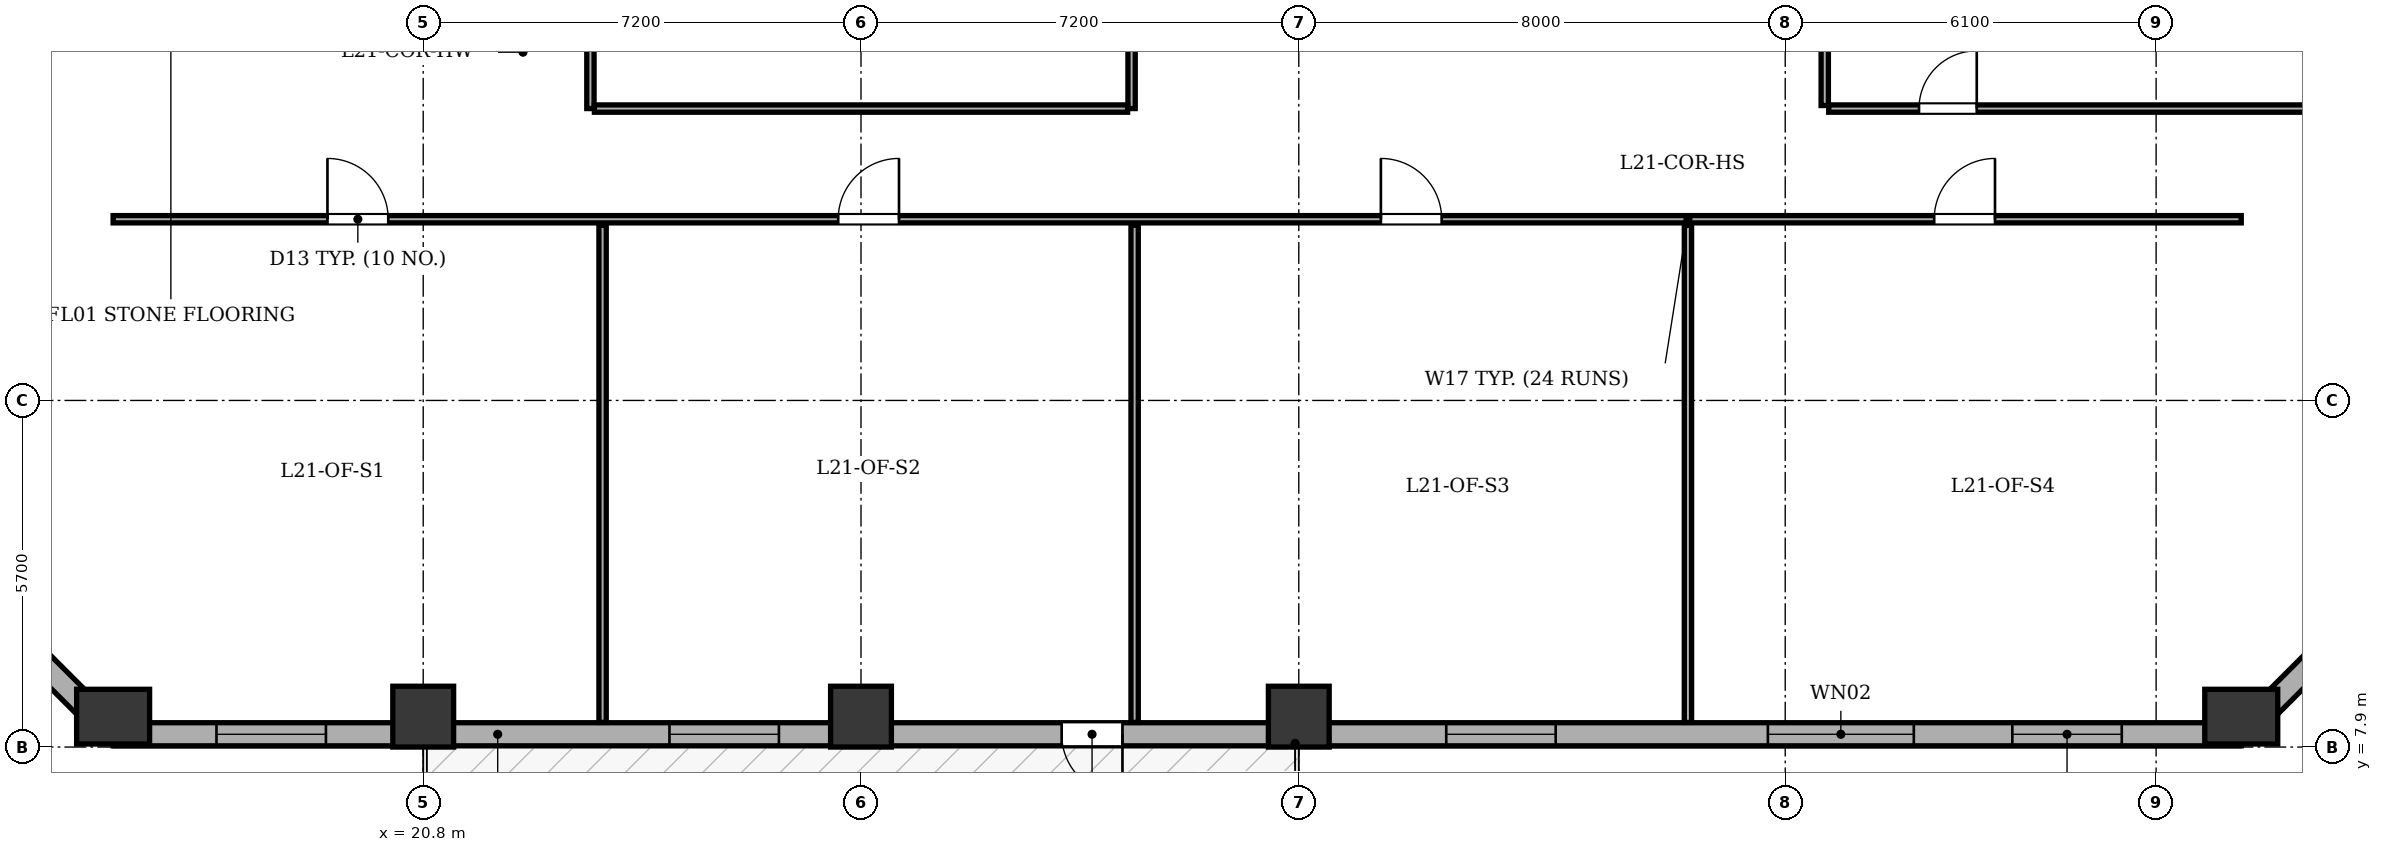
"""IFC4 building model, lengths in metres.
Left out: names, types, materials, properties, quantities, classifications, styles, units other than length and angle.
Written with IfcOpenShell. Run it as: python <this file> out.ifc"""

import sys

from ifc_helpers import new_model, si_unit, direction, frame, frame_2d, origin, origin_2d, place, context, subcontext, project, spatial, rectangle, extrude, element, fill, save


model = new_model("IFC4")
c1 = context("Model", 3, precision=1e-05, world=origin(), true_north=direction((0.0, 1.0)))
c2 = subcontext(c1, "Body", "Model", "MODEL_VIEW")
j1 = project(units=[si_unit("LENGTHUNIT", "METRE"), si_unit("PLANEANGLEUNIT", "RADIAN")], contexts=[c1])
p1 = place(None, origin())
s1 = spatial("IfcSite", under=j1, at=p1, CompositionType="ELEMENT")
p2 = place(p1, origin())
s2 = spatial("IfcBuilding", under=s1, at=p2, CompositionType="ELEMENT")
p3 = place(p2, frame((0.0, 0.0, 86.7)))
s3 = spatial("IfcBuildingStorey", under=s2, at=p3, CompositionType="ELEMENT", Elevation=86.7)
p4 = place(p3, frame((15.7, 8.4, 0.0), z_axis=(0.0, 0.0, 1.0), x_axis=(1.0, 0.0, 0.0)))
e1 = element("IfcColumn", 1, at=p4, inside=s3, PredefinedType="COLUMN", context=c2, shape_type="SweptSolid", body=[
    extrude(rectangle(XDim=0.9, YDim=1.2, at=origin_2d()), origin(), (0.0, 0.0, 1.0), 3.9),
])
for number, where, z_axis, x_axis in (
    (2, (20.8, 8.4, 0.0), (0.0, 0.0, 1.0), (1.0, 0.0, 0.0)),
    (3, (28.0, 8.4, 0.0), (0.0, 0.0, 1.0), (1.0, 0.0, 0.0)),
    (4, (35.2, 8.4, 0.0), (0.0, 0.0, 1.0), (1.0, 0.0, 0.0)),
):
    element("IfcColumn", number, at=place(p3, frame(where, z_axis=z_axis, x_axis=x_axis)), inside=s3, PredefinedType="COLUMN", context=c2, shape_type="SweptSolid", body=[
        extrude(rectangle(XDim=1.0, YDim=1.0, at=origin_2d()), origin(), (0.0, 0.0, 1.0), 3.9),
    ])
p5 = place(p3, frame((50.7, 8.4, 0.0), z_axis=(0.0, 0.0, 1.0), x_axis=(1.0, 0.0, 0.0)))
e5 = element("IfcColumn", 5, at=p5, inside=s3, PredefinedType="COLUMN", context=c2, shape_type="SweptSolid", body=[
    extrude(rectangle(XDim=0.9, YDim=1.2, at=origin_2d()), origin(), (0.0, 0.0, 1.0), 3.9),
])
p6 = place(p3, frame((50.7, 8.11, 0.0), z_axis=(0.0, 0.0, 1.0), x_axis=(-1.0, 0.0, 0.0)))
e6 = element("IfcWall", 6, at=p6, inside=s3, PredefinedType="STANDARD", context=c2, shape_type="SweptSolid", body=[
    extrude(rectangle(XDim=35.0, YDim=0.38, at=frame_2d((17.5, 0.0))), origin(), (0.0, 0.0, 1.0), 3.135),
])
p7 = place(p6, frame((18.4, 0.0, 0.0)))
e7 = element("IfcOpeningElement", 7, at=p7, cuts=e6, PredefinedType="OPENING", context=c2, shape_type="SweptSolid", body=[
    extrude(rectangle(XDim=1.0, YDim=2.02, at=frame_2d((0.5, 1.01))), frame((0.0, 0.2, 0.0), z_axis=(0.0, -1.0, 0.0), x_axis=(1.0, 0.0, 0.0)), (0.0, 0.0, 1.0), 0.4),
])
p8 = place(p6, frame((1.965, 0.0, 0.8)))
e8 = element("IfcOpeningElement", 8, at=p8, cuts=e6, PredefinedType="OPENING", context=c2, shape_type="SweptSolid", body=[
    extrude(rectangle(XDim=1.8, YDim=1.9, at=frame_2d((0.9, 0.95))), frame((0.0, 0.2, 0.0), z_axis=(0.0, -1.0, 0.0), x_axis=(1.0, 0.0, 0.0)), (0.0, 0.0, 1.0), 0.4),
])
p9 = place(p6, frame((5.385, 0.0, 0.8)))
e9 = element("IfcOpeningElement", 9, at=p9, cuts=e6, PredefinedType="OPENING", context=c2, shape_type="SweptSolid", body=[
    extrude(rectangle(XDim=2.4, YDim=1.9, at=frame_2d((1.2, 0.95))), frame((0.0, 0.2, 0.0), z_axis=(0.0, -1.0, 0.0), x_axis=(1.0, 0.0, 0.0)), (0.0, 0.0, 1.0), 0.4),
])
p10 = place(p6, frame((11.275, 0.0, 0.8)))
e10 = element("IfcOpeningElement", 10, at=p10, cuts=e6, PredefinedType="OPENING", context=c2, shape_type="SweptSolid", body=[
    extrude(rectangle(XDim=1.8, YDim=1.9, at=frame_2d((0.9, 0.95))), frame((0.0, 0.2, 0.0), z_axis=(0.0, -1.0, 0.0), x_axis=(1.0, 0.0, 0.0)), (0.0, 0.0, 1.0), 0.4),
])
p11 = place(p6, frame((24.05, 0.0, 0.8)))
e11 = element("IfcOpeningElement", 11, at=p11, cuts=e6, PredefinedType="OPENING", context=c2, shape_type="SweptSolid", body=[
    extrude(rectangle(XDim=1.8, YDim=1.9, at=frame_2d((0.9, 0.95))), frame((0.0, 0.2, 0.0), z_axis=(0.0, -1.0, 0.0), x_axis=(1.0, 0.0, 0.0)), (0.0, 0.0, 1.0), 0.4),
])
p12 = place(p6, frame((31.5, 0.0, 0.8)))
e12 = element("IfcOpeningElement", 12, at=p12, cuts=e6, PredefinedType="OPENING", context=c2, shape_type="SweptSolid", body=[
    extrude(rectangle(XDim=1.8, YDim=1.9, at=frame_2d((0.9, 0.95))), frame((0.0, 0.2, 0.0), z_axis=(0.0, -1.0, 0.0), x_axis=(1.0, 0.0, 0.0)), (0.0, 0.0, 1.0), 0.4),
])
p13 = place(p3, frame((15.7, 8.11, 0.0), z_axis=(0.0, 0.0, 1.0), x_axis=(-0.707124801467, 0.707088760447, 0.0)))
e13 = element("IfcWall", 13, at=p13, inside=s3, PredefinedType="STANDARD", context=c2, shape_type="SweptSolid", body=[
    extrude(rectangle(XDim=6.774, YDim=0.38, at=frame_2d((3.387, 0.0))), origin(), (0.0, 0.0, 1.0), 3.135),
])
p14 = place(p13, frame((2.687, 0.0, 0.8)))
e14 = element("IfcOpeningElement", 14, at=p14, cuts=e13, PredefinedType="OPENING", context=c2, shape_type="SweptSolid", body=[
    extrude(rectangle(XDim=1.4, YDim=1.65, at=frame_2d((0.7, 0.825))), frame((0.0, 0.2, 0.0), z_axis=(0.0, -1.0, 0.0), x_axis=(1.0, 0.0, 0.0)), (0.0, 0.0, 1.0), 0.4),
])
p15 = place(p3, frame((55.49, 12.9, 0.0), z_axis=(0.0, 0.0, 1.0), x_axis=(-0.707124801467, -0.707088760447, 0.0)))
e15 = element("IfcWall", 15, at=p15, inside=s3, PredefinedType="STANDARD", context=c2, shape_type="SweptSolid", body=[
    extrude(rectangle(XDim=6.774, YDim=0.38, at=frame_2d((3.387, 0.0))), origin(), (0.0, 0.0, 1.0), 3.135),
])
p16 = place(p15, frame((2.687, 0.0, 0.8)))
e16 = element("IfcOpeningElement", 16, at=p16, cuts=e15, PredefinedType="OPENING", context=c2, shape_type="SweptSolid", body=[
    extrude(rectangle(XDim=1.4, YDim=1.65, at=frame_2d((0.7, 0.825))), frame((0.0, 0.2, 0.0), z_axis=(0.0, -1.0, 0.0), x_axis=(1.0, 0.0, 0.0)), (0.0, 0.0, 1.0), 0.4),
])
for number, where, z_axis, x_axis in (
    (17, (23.55, 18.4, 0.0), (0.0, 0.0, 1.0), (0.0, 1.0, 0.0)),
    (18, (32.45, 18.4, 0.0), (0.0, 0.0, 1.0), (0.0, 1.0, 0.0)),
):
    element("IfcWall", number, at=place(p3, frame(where, z_axis=z_axis, x_axis=x_axis)), inside=s3, PredefinedType="PARTITIONING", context=c2, shape_type="SweptSolid", body=[
        extrude(rectangle(XDim=3.485, YDim=0.12, at=frame_2d((1.743, 0.0))), origin(), (0.0, 0.0, 1.0), 3.6),
    ])
p17 = place(p3, frame((23.615, 18.4, 0.0), z_axis=(0.0, 0.0, 1.0), x_axis=(1.0, 0.0, 0.0)))
e19 = element("IfcWall", 19, at=p17, inside=s3, PredefinedType="PARTITIONING", context=c2, shape_type="SweptSolid", body=[
    extrude(rectangle(XDim=8.77, YDim=0.12, at=frame_2d((4.385, 0.0))), origin(), (0.0, 0.0, 1.0), 3.6),
])
p18 = place(p3, frame((15.7, 16.58, 0.0), z_axis=(0.0, 0.0, 1.0), x_axis=(1.0, 0.0, 0.0)))
e20 = element("IfcWall", 20, at=p18, inside=s3, PredefinedType="PARTITIONING", context=c2, shape_type="SweptSolid", body=[
    extrude(rectangle(XDim=35.0, YDim=0.12, at=frame_2d((17.5, 0.0))), origin(), (0.0, 0.0, 1.0), 3.6),
])
p19 = place(p18, frame((3.525, 0.0, 0.0)))
e21 = element("IfcOpeningElement", 21, at=p19, cuts=e20, PredefinedType="OPENING", context=c2, shape_type="SweptSolid", body=[
    extrude(rectangle(XDim=1.0, YDim=2.1, at=frame_2d((0.5, 1.05))), frame((0.0, 0.07, 0.0), z_axis=(0.0, -1.0, 0.0), x_axis=(1.0, 0.0, 0.0)), (0.0, 0.0, 1.0), 0.14),
])
p20 = place(p18, frame((11.925, 0.0, 0.0)))
e22 = element("IfcOpeningElement", 22, at=p20, cuts=e20, PredefinedType="OPENING", context=c2, shape_type="SweptSolid", body=[
    extrude(rectangle(XDim=1.0, YDim=2.1, at=frame_2d((0.5, 1.05))), frame((0.0, 0.07, 0.0), z_axis=(0.0, -1.0, 0.0), x_axis=(1.0, 0.0, 0.0)), (0.0, 0.0, 1.0), 0.14),
])
p21 = place(p18, frame((20.85, 0.0, 0.0)))
e23 = element("IfcOpeningElement", 23, at=p21, cuts=e20, PredefinedType="OPENING", context=c2, shape_type="SweptSolid", body=[
    extrude(rectangle(XDim=1.0, YDim=2.1, at=frame_2d((0.5, 1.05))), frame((0.0, 0.07, 0.0), z_axis=(0.0, -1.0, 0.0), x_axis=(1.0, 0.0, 0.0)), (0.0, 0.0, 1.0), 0.14),
])
p22 = place(p18, frame((29.95, 0.0, 0.0)))
e24 = element("IfcOpeningElement", 24, at=p22, cuts=e20, PredefinedType="OPENING", context=c2, shape_type="SweptSolid", body=[
    extrude(rectangle(XDim=1.0, YDim=2.1, at=frame_2d((0.5, 1.05))), frame((0.0, 0.07, 0.0), z_axis=(0.0, -1.0, 0.0), x_axis=(1.0, 0.0, 0.0)), (0.0, 0.0, 1.0), 0.14),
])
for number, where, z_axis, x_axis in (
    (25, (23.75, 8.305, 0.0), (0.0, 0.0, 1.0), (0.0, 1.0, 0.0)),
    (26, (32.5, 8.305, 0.0), (0.0, 0.0, 1.0), (0.0, 1.0, 0.0)),
    (27, (41.6, 8.305, 0.0), (0.0, 0.0, 1.0), (0.0, 1.0, 0.0)),
):
    element("IfcWall", number, at=place(p3, frame(where, z_axis=z_axis, x_axis=x_axis)), inside=s3, PredefinedType="PARTITIONING", context=c2, shape_type="SweptSolid", body=[
        extrude(rectangle(XDim=8.175, YDim=0.12, at=frame_2d((4.087, 0.0))), origin(), (0.0, 0.0, 1.0), 3.6),
    ])
p23 = place(p3, frame((43.85, 18.45, 0.0), z_axis=(0.0, 0.0, 1.0), x_axis=(0.0, 1.0, 0.0)))
e28 = element("IfcWall", 28, at=p23, inside=s3, PredefinedType="PARTITIONING", context=c2, shape_type="SweptSolid", body=[
    extrude(rectangle(XDim=17.5, YDim=0.12, at=frame_2d((8.75, 0.0))), origin(), (0.0, 0.0, 1.0), 3.6),
])
p24 = place(p3, frame((43.915, 18.4, 0.0), z_axis=(0.0, 0.0, 1.0), x_axis=(1.0, 0.0, 0.0)))
e29 = element("IfcWall", 29, at=p24, inside=s3, PredefinedType="PARTITIONING", context=c2, shape_type="SweptSolid", body=[
    extrude(rectangle(XDim=11.38, YDim=0.12, at=frame_2d((5.69, 0.0))), origin(), (0.0, 0.0, 1.0), 3.6),
])
p25 = place(p24, frame((1.485, 0.0, 0.0)))
e30 = element("IfcOpeningElement", 30, at=p25, cuts=e29, PredefinedType="OPENING", context=c2, shape_type="SweptSolid", body=[
    extrude(rectangle(XDim=0.95, YDim=2.1, at=frame_2d((0.475, 1.05))), frame((0.0, 0.07, 0.0), z_axis=(0.0, -1.0, 0.0), x_axis=(1.0, 0.0, 0.0)), (0.0, 0.0, 1.0), 0.14),
])
p26 = place(p7, origin())
e31 = element("IfcDoor", 31, at=p26, inside=s3, OperationType="SINGLE_SWING_LEFT", PredefinedType="DOOR", context=c2, shape_type="SweptSolid", body=[
    extrude(rectangle(XDim=1.0, YDim=2.02, at=frame_2d((0.5, 1.01))), frame((0.0, 0.025, 0.0), z_axis=(0.0, -1.0, 0.0), x_axis=(1.0, 0.0, 0.0)), (0.0, 0.0, 1.0), 0.05),
])
fill(e7, e31)
p27 = place(p8, origin())
e32 = element("IfcWindow", 32, at=p27, inside=s3, PartitioningType="SINGLE_PANEL", PredefinedType="WINDOW", context=c2, shape_type="SweptSolid", body=[
    extrude(rectangle(XDim=1.8, YDim=1.9, at=frame_2d((0.9, 0.95))), frame((0.0, -0.01, 0.0), z_axis=(0.0, -1.0, 0.0), x_axis=(1.0, 0.0, 0.0)), (0.0, 0.0, 1.0), 0.06),
])
fill(e8, e32)
p28 = place(p9, origin())
e33 = element("IfcWindow", 33, at=p28, inside=s3, PartitioningType="SINGLE_PANEL", PredefinedType="WINDOW", context=c2, shape_type="SweptSolid", body=[
    extrude(rectangle(XDim=2.4, YDim=1.9, at=frame_2d((1.2, 0.95))), frame((0.0, -0.01, 0.0), z_axis=(0.0, -1.0, 0.0), x_axis=(1.0, 0.0, 0.0)), (0.0, 0.0, 1.0), 0.06),
])
fill(e9, e33)
p29 = place(p10, origin())
e34 = element("IfcWindow", 34, at=p29, inside=s3, PartitioningType="SINGLE_PANEL", PredefinedType="WINDOW", context=c2, shape_type="SweptSolid", body=[
    extrude(rectangle(XDim=1.8, YDim=1.9, at=frame_2d((0.9, 0.95))), frame((0.0, -0.01, 0.0), z_axis=(0.0, -1.0, 0.0), x_axis=(1.0, 0.0, 0.0)), (0.0, 0.0, 1.0), 0.06),
])
fill(e10, e34)
p30 = place(p11, origin())
e35 = element("IfcWindow", 35, at=p30, inside=s3, PartitioningType="SINGLE_PANEL", PredefinedType="WINDOW", context=c2, shape_type="SweptSolid", body=[
    extrude(rectangle(XDim=1.8, YDim=1.9, at=frame_2d((0.9, 0.95))), frame((0.0, -0.01, 0.0), z_axis=(0.0, -1.0, 0.0), x_axis=(1.0, 0.0, 0.0)), (0.0, 0.0, 1.0), 0.06),
])
fill(e11, e35)
p31 = place(p12, origin())
e36 = element("IfcWindow", 36, at=p31, inside=s3, PartitioningType="SINGLE_PANEL", PredefinedType="WINDOW", context=c2, shape_type="SweptSolid", body=[
    extrude(rectangle(XDim=1.8, YDim=1.9, at=frame_2d((0.9, 0.95))), frame((0.0, -0.01, 0.0), z_axis=(0.0, -1.0, 0.0), x_axis=(1.0, 0.0, 0.0)), (0.0, 0.0, 1.0), 0.06),
])
fill(e12, e36)
p32 = place(p19, origin())
e37 = element("IfcDoor", 37, at=p32, inside=s3, OperationType="SINGLE_SWING_LEFT", PredefinedType="DOOR", context=c2, shape_type="SweptSolid", body=[
    extrude(rectangle(XDim=1.0, YDim=2.1, at=frame_2d((0.5, 1.05))), frame((0.0, 0.025, 0.0), z_axis=(0.0, -1.0, 0.0), x_axis=(1.0, 0.0, 0.0)), (0.0, 0.0, 1.0), 0.05),
])
fill(e21, e37)
p33 = place(p20, origin())
e38 = element("IfcDoor", 38, at=p33, inside=s3, OperationType="SINGLE_SWING_RIGHT", PredefinedType="DOOR", context=c2, shape_type="SweptSolid", body=[
    extrude(rectangle(XDim=1.0, YDim=2.1, at=frame_2d((0.5, 1.05))), frame((0.0, 0.025, 0.0), z_axis=(0.0, -1.0, 0.0), x_axis=(1.0, 0.0, 0.0)), (0.0, 0.0, 1.0), 0.05),
])
fill(e22, e38)
p34 = place(p21, origin())
e39 = element("IfcDoor", 39, at=p34, inside=s3, OperationType="SINGLE_SWING_LEFT", PredefinedType="DOOR", context=c2, shape_type="SweptSolid", body=[
    extrude(rectangle(XDim=1.0, YDim=2.1, at=frame_2d((0.5, 1.05))), frame((0.0, 0.025, 0.0), z_axis=(0.0, -1.0, 0.0), x_axis=(1.0, 0.0, 0.0)), (0.0, 0.0, 1.0), 0.05),
])
fill(e23, e39)
p35 = place(p22, origin())
e40 = element("IfcDoor", 40, at=p35, inside=s3, OperationType="SINGLE_SWING_RIGHT", PredefinedType="DOOR", context=c2, shape_type="SweptSolid", body=[
    extrude(rectangle(XDim=1.0, YDim=2.1, at=frame_2d((0.5, 1.05))), frame((0.0, 0.025, 0.0), z_axis=(0.0, -1.0, 0.0), x_axis=(1.0, 0.0, 0.0)), (0.0, 0.0, 1.0), 0.05),
])
fill(e24, e40)
p36 = place(p25, origin())
e41 = element("IfcDoor", 41, at=p36, inside=s3, OperationType="SINGLE_SWING_RIGHT", PredefinedType="DOOR", context=c2, shape_type="SweptSolid", body=[
    extrude(rectangle(XDim=0.95, YDim=2.1, at=frame_2d((0.475, 1.05))), frame((0.0, 0.025, 0.0), z_axis=(0.0, -1.0, 0.0), x_axis=(1.0, 0.0, 0.0)), (0.0, 0.0, 1.0), 0.05),
])
fill(e30, e41)
save(model, sys.argv[1])
